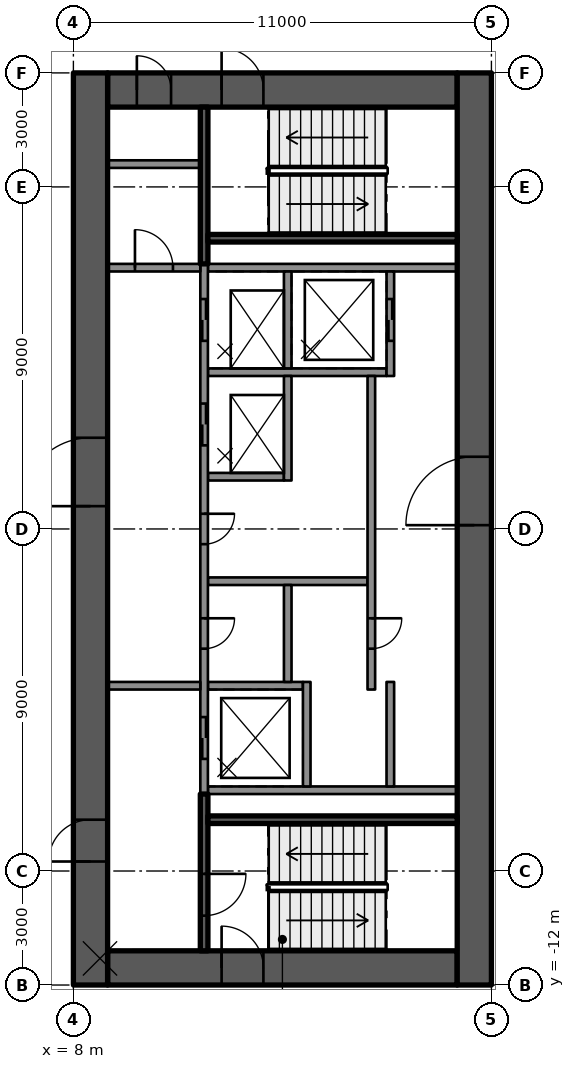
"""IFC4 building model, lengths in metres.
Left out: names, types, materials, properties, quantities, classifications, styles, units other than length and angle.
Written with IfcOpenShell. Run it as: python <this file> out.ifc"""

import sys

from ifc_helpers import new_model, si_unit, direction, frame, frame_2d, origin, place, context, subcontext, project, spatial, rectangle, extrude, element, fill, save


model = new_model("IFC4")
c1 = context("Model", 3, precision=1e-05, world=origin(), true_north=direction((0.0, 1.0)))
c2 = subcontext(c1, "Body", "Model", "MODEL_VIEW")
j1 = project(units=[si_unit("LENGTHUNIT", "METRE"), si_unit("PLANEANGLEUNIT", "RADIAN")], contexts=[c1])
p1 = place(None, origin())
s1 = spatial("IfcSite", under=j1, at=p1, CompositionType="ELEMENT")
p2 = place(p1, origin())
s2 = spatial("IfcBuilding", under=s1, at=p2, CompositionType="ELEMENT")
p3 = place(p2, frame((0.0, 0.0, 249.5)))
s3 = spatial("IfcBuildingStorey", under=s2, at=p3, CompositionType="ELEMENT", Elevation=249.5)
p4 = place(p3, frame((8.9, 11.55, 0.0), z_axis=(0.0, 0.0, 1.0), x_axis=(1.0, 0.0, 0.0)))
e1 = element("IfcWall", 1, at=p4, inside=s3, PredefinedType="SHEAR", context=c2, shape_type="SweptSolid", body=[
    extrude(rectangle(XDim=9.2, YDim=0.9, at=frame_2d((4.6, 0.0))), origin(), (0.0, 0.0, 1.0), 4.0),
])
p5 = place(p4, frame((3.0, 0.0, 0.0)))
e2 = element("IfcOpeningElement", 2, at=p5, cuts=e1, PredefinedType="OPENING", context=c2, shape_type="SweptSolid", body=[
    extrude(rectangle(XDim=1.1, YDim=2.1, at=frame_2d((0.55, 1.05))), frame((0.0, 0.46, 0.0), z_axis=(0.0, -1.0, 0.0), x_axis=(1.0, 0.0, 0.0)), (0.0, 0.0, 1.0), 0.92),
])
p6 = place(p4, frame((0.77, 0.0, 0.0)))
e3 = element("IfcOpeningElement", 3, at=p6, cuts=e1, PredefinedType="OPENING", context=c2, shape_type="SweptSolid", body=[
    extrude(rectangle(XDim=0.9, YDim=2.1, at=frame_2d((0.45, 1.05))), frame((0.0, 0.46, 0.0), z_axis=(0.0, -1.0, 0.0), x_axis=(1.0, 0.0, 0.0)), (0.0, 0.0, 1.0), 0.92),
])
p7 = place(p3, frame((8.9, -11.55, 0.0), z_axis=(0.0, 0.0, 1.0), x_axis=(1.0, 0.0, 0.0)))
e4 = element("IfcWall", 4, at=p7, inside=s3, PredefinedType="SHEAR", context=c2, shape_type="SweptSolid", body=[
    extrude(rectangle(XDim=9.2, YDim=0.9, at=frame_2d((4.6, 0.0))), origin(), (0.0, 0.0, 1.0), 4.0),
])
p8 = place(p7, frame((3.0, 0.0, 0.0)))
e5 = element("IfcOpeningElement", 5, at=p8, cuts=e4, PredefinedType="OPENING", context=c2, shape_type="SweptSolid", body=[
    extrude(rectangle(XDim=1.1, YDim=2.1, at=frame_2d((0.55, 1.05))), frame((0.0, 0.46, 0.0), z_axis=(0.0, -1.0, 0.0), x_axis=(1.0, 0.0, 0.0)), (0.0, 0.0, 1.0), 0.92),
])
p9 = place(p3, frame((8.45, -12.0, 0.0), z_axis=(0.0, 0.0, 1.0), x_axis=(0.0, 1.0, 0.0)))
e6 = element("IfcWall", 6, at=p9, inside=s3, PredefinedType="SHEAR", context=c2, shape_type="SweptSolid", body=[
    extrude(rectangle(XDim=24.0, YDim=0.9, at=frame_2d((12.0, 0.0))), origin(), (0.0, 0.0, 1.0), 4.0),
])
p10 = place(p9, frame((12.6, 0.0, 0.0)))
e7 = element("IfcOpeningElement", 7, at=p10, cuts=e6, PredefinedType="OPENING", context=c2, shape_type="SweptSolid", body=[
    extrude(rectangle(XDim=1.8, YDim=2.1, at=frame_2d((0.9, 1.05))), frame((0.0, 0.46, 0.0), z_axis=(0.0, -1.0, 0.0), x_axis=(1.0, 0.0, 0.0)), (0.0, 0.0, 1.0), 0.92),
])
p11 = place(p9, frame((3.25, 0.0, 0.0)))
e8 = element("IfcOpeningElement", 8, at=p11, cuts=e6, PredefinedType="OPENING", context=c2, shape_type="SweptSolid", body=[
    extrude(rectangle(XDim=1.1, YDim=2.1, at=frame_2d((0.55, 1.05))), frame((0.0, 0.46, 0.0), z_axis=(0.0, -1.0, 0.0), x_axis=(1.0, 0.0, 0.0)), (0.0, 0.0, 1.0), 0.92),
])
p12 = place(p3, frame((18.55, -12.0, 0.0), z_axis=(0.0, 0.0, 1.0), x_axis=(0.0, 1.0, 0.0)))
e9 = element("IfcWall", 9, at=p12, inside=s3, PredefinedType="SHEAR", context=c2, shape_type="SweptSolid", body=[
    extrude(rectangle(XDim=24.0, YDim=0.9, at=frame_2d((12.0, 0.0))), origin(), (0.0, 0.0, 1.0), 4.0),
])
p13 = place(p12, frame((12.1, 0.0, 0.0)))
e10 = element("IfcOpeningElement", 10, at=p13, cuts=e9, PredefinedType="OPENING", context=c2, shape_type="SweptSolid", body=[
    extrude(rectangle(XDim=1.8, YDim=2.1, at=frame_2d((0.9, 1.05))), frame((0.0, 0.46, 0.0), z_axis=(0.0, -1.0, 0.0), x_axis=(1.0, 0.0, 0.0)), (0.0, 0.0, 1.0), 0.92),
])
for number, where, z_axis, x_axis in (
    (11, (11.54, -6.875, 0.0), (0.0, 0.0, 1.0), (1.0, 0.0, 0.0)),
    (12, (11.54, 6.875, 0.0), (0.0, 0.0, 1.0), (1.0, 0.0, 0.0)),
):
    element("IfcWall", number, at=place(p3, frame(where, z_axis=z_axis, x_axis=x_axis)), inside=s3, PredefinedType="SOLIDWALL", context=c2, shape_type="SweptSolid", body=[
        extrude(rectangle(XDim=6.56, YDim=0.2, at=frame_2d((3.28, 0.0))), origin(), (0.0, 0.0, 1.0), 3.58),
    ])
p14 = place(p3, frame((11.54, 4.125, 0.0), z_axis=(0.0, 0.0, 1.0), x_axis=(1.0, 0.0, 0.0)))
e13 = element("IfcWall", 13, at=p14, inside=s3, PredefinedType="SOLIDWALL", context=c2, shape_type="SweptSolid", body=[
    extrude(rectangle(XDim=4.7, YDim=0.2, at=frame_2d((2.35, 0.0))), origin(), (0.0, 0.0, 1.0), 3.58),
])
p15 = place(p3, frame((11.54, 1.375, 0.0), z_axis=(0.0, 0.0, 1.0), x_axis=(1.0, 0.0, 0.0)))
e14 = element("IfcWall", 14, at=p15, inside=s3, PredefinedType="SOLIDWALL", context=c2, shape_type="SweptSolid", body=[
    extrude(rectangle(XDim=2.0, YDim=0.2, at=frame_2d((1.0, 0.0))), origin(), (0.0, 0.0, 1.0), 3.58),
])
p16 = place(p3, frame((11.54, -1.375, 0.0), z_axis=(0.0, 0.0, 1.0), x_axis=(1.0, 0.0, 0.0)))
e15 = element("IfcWall", 15, at=p16, inside=s3, PredefinedType="SOLIDWALL", context=c2, shape_type="SweptSolid", body=[
    extrude(rectangle(XDim=4.2, YDim=0.2, at=frame_2d((2.1, 0.0))), origin(), (0.0, 0.0, 1.0), 3.58),
])
p17 = place(p3, frame((11.54, -4.125, 0.0), z_axis=(0.0, 0.0, 1.0), x_axis=(1.0, 0.0, 0.0)))
e16 = element("IfcWall", 16, at=p17, inside=s3, PredefinedType="SOLIDWALL", context=c2, shape_type="SweptSolid", body=[
    extrude(rectangle(XDim=2.5, YDim=0.2, at=frame_2d((1.25, 0.0))), origin(), (0.0, 0.0, 1.0), 3.58),
])
p18 = place(p3, frame((11.44, 6.975, 0.0), z_axis=(0.0, 0.0, 1.0), x_axis=(0.0, -1.0, 0.0)))
e17 = element("IfcWall", 17, at=p18, inside=s3, PredefinedType="SOLIDWALL", context=c2, shape_type="SweptSolid", body=[
    extrude(rectangle(XDim=13.95, YDim=0.2, at=frame_2d((6.975, 0.0))), origin(), (0.0, 0.0, 1.0), 3.58),
])
p19 = place(p18, frame((0.925, 0.0, 0.0)))
e18 = element("IfcOpeningElement", 18, at=p19, cuts=e17, PredefinedType="OPENING", context=c2, shape_type="SweptSolid", body=[
    extrude(rectangle(XDim=1.1, YDim=2.1, at=frame_2d((0.55, 1.05))), frame((0.0, 0.11, 0.0), z_axis=(0.0, -1.0, 0.0), x_axis=(1.0, 0.0, 0.0)), (0.0, 0.0, 1.0), 0.22),
])
p20 = place(p18, frame((3.675, 0.0, 0.0)))
e19 = element("IfcOpeningElement", 19, at=p20, cuts=e17, PredefinedType="OPENING", context=c2, shape_type="SweptSolid", body=[
    extrude(rectangle(XDim=1.1, YDim=2.1, at=frame_2d((0.55, 1.05))), frame((0.0, 0.11, 0.0), z_axis=(0.0, -1.0, 0.0), x_axis=(1.0, 0.0, 0.0)), (0.0, 0.0, 1.0), 0.22),
])
p21 = place(p18, frame((11.925, 0.0, 0.0)))
e20 = element("IfcOpeningElement", 20, at=p21, cuts=e17, PredefinedType="OPENING", context=c2, shape_type="SweptSolid", body=[
    extrude(rectangle(XDim=1.1, YDim=2.1, at=frame_2d((0.55, 1.05))), frame((0.0, 0.11, 0.0), z_axis=(0.0, -1.0, 0.0), x_axis=(1.0, 0.0, 0.0)), (0.0, 0.0, 1.0), 0.22),
])
p22 = place(p18, frame((6.575, 0.0, 0.0)))
e21 = element("IfcOpeningElement", 21, at=p22, cuts=e17, PredefinedType="OPENING", context=c2, shape_type="SweptSolid", body=[
    extrude(rectangle(XDim=0.8, YDim=2.1, at=frame_2d((0.4, 1.05))), frame((0.0, 0.11, 0.0), z_axis=(0.0, -1.0, 0.0), x_axis=(1.0, 0.0, 0.0)), (0.0, 0.0, 1.0), 0.22),
])
p23 = place(p18, frame((9.325, 0.0, 0.0)))
e22 = element("IfcOpeningElement", 22, at=p23, cuts=e17, PredefinedType="OPENING", context=c2, shape_type="SweptSolid", body=[
    extrude(rectangle(XDim=0.8, YDim=2.1, at=frame_2d((0.4, 1.05))), frame((0.0, 0.11, 0.0), z_axis=(0.0, -1.0, 0.0), x_axis=(1.0, 0.0, 0.0)), (0.0, 0.0, 1.0), 0.22),
])
p24 = place(p3, frame((13.64, 6.775, 0.0), z_axis=(0.0, 0.0, 1.0), x_axis=(0.0, -1.0, 0.0)))
e23 = element("IfcWall", 23, at=p24, inside=s3, PredefinedType="SOLIDWALL", context=c2, shape_type="SweptSolid", body=[
    extrude(rectangle(XDim=2.55, YDim=0.2, at=frame_2d((1.275, 0.0))), origin(), (0.0, 0.0, 1.0), 3.58),
])
p25 = place(p3, frame((13.64, 4.025, 0.0), z_axis=(0.0, 0.0, 1.0), x_axis=(0.0, -1.0, 0.0)))
e24 = element("IfcWall", 24, at=p25, inside=s3, PredefinedType="SOLIDWALL", context=c2, shape_type="SweptSolid", body=[
    extrude(rectangle(XDim=2.75, YDim=0.2, at=frame_2d((1.375, 0.0))), origin(), (0.0, 0.0, 1.0), 3.58),
])
p26 = place(p3, frame((13.64, -1.475, 0.0), z_axis=(0.0, 0.0, 1.0), x_axis=(0.0, -1.0, 0.0)))
e25 = element("IfcWall", 25, at=p26, inside=s3, PredefinedType="SOLIDWALL", context=c2, shape_type="SweptSolid", body=[
    extrude(rectangle(XDim=2.55, YDim=0.2, at=frame_2d((1.275, 0.0))), origin(), (0.0, 0.0, 1.0), 3.58),
])
p27 = place(p3, frame((14.14, -4.025, 0.0), z_axis=(0.0, 0.0, 1.0), x_axis=(0.0, -1.0, 0.0)))
e26 = element("IfcWall", 26, at=p27, inside=s3, PredefinedType="SOLIDWALL", context=c2, shape_type="SweptSolid", body=[
    extrude(rectangle(XDim=2.75, YDim=0.2, at=frame_2d((1.375, 0.0))), origin(), (0.0, 0.0, 1.0), 3.58),
])
p28 = place(p3, frame((16.34, 6.775, 0.0), z_axis=(0.0, 0.0, 1.0), x_axis=(0.0, -1.0, 0.0)))
e27 = element("IfcWall", 27, at=p28, inside=s3, PredefinedType="SOLIDWALL", context=c2, shape_type="SweptSolid", body=[
    extrude(rectangle(XDim=2.75, YDim=0.2, at=frame_2d((1.375, 0.0))), origin(), (0.0, 0.0, 1.0), 3.58),
])
p29 = place(p28, frame((0.725, 0.0, 0.0)))
e28 = element("IfcOpeningElement", 28, at=p29, cuts=e27, PredefinedType="OPENING", context=c2, shape_type="SweptSolid", body=[
    extrude(rectangle(XDim=1.1, YDim=2.1, at=frame_2d((0.55, 1.05))), frame((0.0, 0.11, 0.0), z_axis=(0.0, -1.0, 0.0), x_axis=(1.0, 0.0, 0.0)), (0.0, 0.0, 1.0), 0.22),
])
p30 = place(p3, frame((15.84, 4.025, 0.0), z_axis=(0.0, 0.0, 1.0), x_axis=(0.0, -1.0, 0.0)))
e29 = element("IfcWall", 29, at=p30, inside=s3, PredefinedType="SOLIDWALL", context=c2, shape_type="SweptSolid", body=[
    extrude(rectangle(XDim=8.25, YDim=0.2, at=frame_2d((4.125, 0.0))), origin(), (0.0, 0.0, 1.0), 3.58),
])
p31 = place(p30, frame((6.375, 0.0, 0.0)))
e30 = element("IfcOpeningElement", 30, at=p31, cuts=e29, PredefinedType="OPENING", context=c2, shape_type="SweptSolid", body=[
    extrude(rectangle(XDim=0.8, YDim=2.1, at=frame_2d((0.4, 1.05))), frame((0.0, 0.11, 0.0), z_axis=(0.0, -1.0, 0.0), x_axis=(1.0, 0.0, 0.0)), (0.0, 0.0, 1.0), 0.22),
])
p32 = place(p3, frame((16.34, -4.025, 0.0), z_axis=(0.0, 0.0, 1.0), x_axis=(0.0, -1.0, 0.0)))
e31 = element("IfcWall", 31, at=p32, inside=s3, PredefinedType="SOLIDWALL", context=c2, shape_type="SweptSolid", body=[
    extrude(rectangle(XDim=2.75, YDim=0.2, at=frame_2d((1.375, 0.0))), origin(), (0.0, 0.0, 1.0), 3.58),
])
p33 = place(p3, frame((11.44, -6.975, 0.0), z_axis=(0.0, 0.0, 1.0), x_axis=(0.0, -1.0, 0.0)))
e32 = element("IfcWall", 32, at=p33, inside=s3, PredefinedType="SOLIDWALL", context=c2, shape_type="SweptSolid", body=[
    extrude(rectangle(XDim=4.125, YDim=0.2, at=frame_2d((2.062, 0.0))), origin(), (0.0, 0.0, 1.0), 3.58),
])
p34 = place(p33, frame((2.1, 0.0, 0.0)))
e33 = element("IfcOpeningElement", 33, at=p34, cuts=e32, PredefinedType="OPENING", context=c2, shape_type="SweptSolid", body=[
    extrude(rectangle(XDim=1.1, YDim=2.1, at=frame_2d((0.55, 1.05))), frame((0.0, 0.11, 0.0), z_axis=(0.0, -1.0, 0.0), x_axis=(1.0, 0.0, 0.0)), (0.0, 0.0, 1.0), 0.22),
])
p35 = place(p3, frame((11.54, -7.65, 0.0), z_axis=(0.0, 0.0, 1.0), x_axis=(1.0, 0.0, 0.0)))
e34 = element("IfcWall", 34, at=p35, inside=s3, PredefinedType="SOLIDWALL", context=c2, shape_type="SweptSolid", body=[
    extrude(rectangle(XDim=6.56, YDim=0.2, at=frame_2d((3.28, 0.0))), origin(), (0.0, 0.0, 1.0), 3.58),
])
p36 = place(p3, frame((11.44, 11.1, 0.0), z_axis=(0.0, 0.0, 1.0), x_axis=(0.0, -1.0, 0.0)))
e35 = element("IfcWall", 35, at=p36, inside=s3, PredefinedType="SOLIDWALL", context=c2, shape_type="SweptSolid", body=[
    extrude(rectangle(XDim=4.125, YDim=0.2, at=frame_2d((2.062, 0.0))), origin(), (0.0, 0.0, 1.0), 3.58),
])
p37 = place(p3, frame((11.54, 7.65, 0.0), z_axis=(0.0, 0.0, 1.0), x_axis=(1.0, 0.0, 0.0)))
e36 = element("IfcWall", 36, at=p37, inside=s3, PredefinedType="SOLIDWALL", context=c2, shape_type="SweptSolid", body=[
    extrude(rectangle(XDim=6.56, YDim=0.2, at=frame_2d((3.28, 0.0))), origin(), (0.0, 0.0, 1.0), 3.58),
])
p38 = place(p3, frame((8.9, -4.125, 0.0), z_axis=(0.0, 0.0, 1.0), x_axis=(1.0, 0.0, 0.0)))
e37 = element("IfcWall", 37, at=p38, inside=s3, PredefinedType="PARTITIONING", context=c2, shape_type="SweptSolid", body=[
    extrude(rectangle(XDim=2.44, YDim=0.2, at=frame_2d((1.22, 0.0))), origin(), (0.0, 0.0, 1.0), 3.58),
])
p39 = place(p3, frame((8.9, 6.875, 0.0), z_axis=(0.0, 0.0, 1.0), x_axis=(1.0, 0.0, 0.0)))
e38 = element("IfcWall", 38, at=p39, inside=s3, PredefinedType="PARTITIONING", context=c2, shape_type="SweptSolid", body=[
    extrude(rectangle(XDim=2.44, YDim=0.2, at=frame_2d((1.22, 0.0))), origin(), (0.0, 0.0, 1.0), 3.58),
])
p40 = place(p39, frame((0.72, 0.0, 0.0)))
e39 = element("IfcOpeningElement", 39, at=p40, cuts=e38, PredefinedType="OPENING", context=c2, shape_type="SweptSolid", body=[
    extrude(rectangle(XDim=1.0, YDim=2.1, at=frame_2d((0.5, 1.05))), frame((0.0, 0.11, 0.0), z_axis=(0.0, -1.0, 0.0), x_axis=(1.0, 0.0, 0.0)), (0.0, 0.0, 1.0), 0.22),
])
p41 = place(p3, frame((8.9, 9.6, 0.0), z_axis=(0.0, 0.0, 1.0), x_axis=(1.0, 0.0, 0.0)))
e40 = element("IfcWall", 40, at=p41, inside=s3, PredefinedType="PARTITIONING", context=c2, shape_type="SweptSolid", body=[
    extrude(rectangle(XDim=2.44, YDim=0.2, at=frame_2d((1.22, 0.0))), origin(), (0.0, 0.0, 1.0), 3.58),
])
p42 = place(p19, origin())
e41 = element("IfcDoor", 41, at=p42, inside=s3, OperationType="DOUBLE_DOOR_SLIDING", PredefinedType="DOOR", context=c2, shape_type="SweptSolid", body=[
    extrude(rectangle(XDim=1.1, YDim=2.1, at=frame_2d((0.55, 1.05))), frame((0.0, 0.025, 0.0), z_axis=(0.0, -1.0, 0.0), x_axis=(1.0, 0.0, 0.0)), (0.0, 0.0, 1.0), 0.05),
])
fill(e18, e41)
p43 = place(p29, origin())
e42 = element("IfcDoor", 42, at=p43, inside=s3, OperationType="DOUBLE_DOOR_SLIDING", PredefinedType="DOOR", context=c2, shape_type="SweptSolid", body=[
    extrude(rectangle(XDim=1.1, YDim=2.1, at=frame_2d((0.55, 1.05))), frame((0.0, 0.025, 0.0), z_axis=(0.0, -1.0, 0.0), x_axis=(1.0, 0.0, 0.0)), (0.0, 0.0, 1.0), 0.05),
])
fill(e28, e42)
p44 = place(p20, origin())
e43 = element("IfcDoor", 43, at=p44, inside=s3, OperationType="DOUBLE_DOOR_SLIDING", PredefinedType="DOOR", context=c2, shape_type="SweptSolid", body=[
    extrude(rectangle(XDim=1.1, YDim=2.1, at=frame_2d((0.55, 1.05))), frame((0.0, 0.025, 0.0), z_axis=(0.0, -1.0, 0.0), x_axis=(1.0, 0.0, 0.0)), (0.0, 0.0, 1.0), 0.05),
])
fill(e19, e43)
p45 = place(p21, origin())
e44 = element("IfcDoor", 44, at=p45, inside=s3, OperationType="DOUBLE_DOOR_SLIDING", PredefinedType="DOOR", context=c2, shape_type="SweptSolid", body=[
    extrude(rectangle(XDim=1.1, YDim=2.1, at=frame_2d((0.55, 1.05))), frame((0.0, 0.025, 0.0), z_axis=(0.0, -1.0, 0.0), x_axis=(1.0, 0.0, 0.0)), (0.0, 0.0, 1.0), 0.05),
])
fill(e20, e44)
p46 = place(p22, origin())
e45 = element("IfcDoor", 45, at=p46, inside=s3, OperationType="SINGLE_SWING_RIGHT", PredefinedType="DOOR", context=c2, shape_type="SweptSolid", body=[
    extrude(rectangle(XDim=0.8, YDim=2.1, at=frame_2d((0.4, 1.05))), frame((0.0, 0.025, 0.0), z_axis=(0.0, -1.0, 0.0), x_axis=(1.0, 0.0, 0.0)), (0.0, 0.0, 1.0), 0.05),
])
fill(e21, e45)
p47 = place(p23, origin())
e46 = element("IfcDoor", 46, at=p47, inside=s3, OperationType="SINGLE_SWING_LEFT", PredefinedType="DOOR", context=c2, shape_type="SweptSolid", body=[
    extrude(rectangle(XDim=0.8, YDim=2.1, at=frame_2d((0.4, 1.05))), frame((0.0, 0.025, 0.0), z_axis=(0.0, -1.0, 0.0), x_axis=(1.0, 0.0, 0.0)), (0.0, 0.0, 1.0), 0.05),
])
fill(e22, e46)
p48 = place(p31, origin())
e47 = element("IfcDoor", 47, at=p48, inside=s3, OperationType="SINGLE_SWING_LEFT", PredefinedType="DOOR", context=c2, shape_type="SweptSolid", body=[
    extrude(rectangle(XDim=0.8, YDim=2.1, at=frame_2d((0.4, 1.05))), frame((0.0, 0.025, 0.0), z_axis=(0.0, -1.0, 0.0), x_axis=(1.0, 0.0, 0.0)), (0.0, 0.0, 1.0), 0.05),
])
fill(e30, e47)
p49 = place(p10, origin())
e48 = element("IfcDoor", 48, at=p49, inside=s3, OperationType="SINGLE_SWING_RIGHT", PredefinedType="DOOR", context=c2, shape_type="SweptSolid", body=[
    extrude(rectangle(XDim=1.8, YDim=2.1, at=frame_2d((0.9, 1.05))), frame((0.0, 0.025, 0.0), z_axis=(0.0, -1.0, 0.0), x_axis=(1.0, 0.0, 0.0)), (0.0, 0.0, 1.0), 0.05),
])
fill(e7, e48)
p50 = place(p13, origin())
e49 = element("IfcDoor", 49, at=p50, inside=s3, OperationType="SINGLE_SWING_RIGHT", PredefinedType="DOOR", context=c2, shape_type="SweptSolid", body=[
    extrude(rectangle(XDim=1.8, YDim=2.1, at=frame_2d((0.9, 1.05))), frame((0.0, 0.025, 0.0), z_axis=(0.0, -1.0, 0.0), x_axis=(1.0, 0.0, 0.0)), (0.0, 0.0, 1.0), 0.05),
])
fill(e10, e49)
p51 = place(p11, origin())
e50 = element("IfcDoor", 50, at=p51, inside=s3, OperationType="SINGLE_SWING_LEFT", PredefinedType="DOOR", context=c2, shape_type="SweptSolid", body=[
    extrude(rectangle(XDim=1.1, YDim=2.1, at=frame_2d((0.55, 1.05))), frame((0.0, 0.025, 0.0), z_axis=(0.0, -1.0, 0.0), x_axis=(1.0, 0.0, 0.0)), (0.0, 0.0, 1.0), 0.05),
])
fill(e8, e50)
p52 = place(p8, origin())
e51 = element("IfcDoor", 51, at=p52, inside=s3, OperationType="SINGLE_SWING_LEFT", PredefinedType="DOOR", context=c2, shape_type="SweptSolid", body=[
    extrude(rectangle(XDim=1.1, YDim=2.1, at=frame_2d((0.55, 1.05))), frame((0.0, 0.025, 0.0), z_axis=(0.0, -1.0, 0.0), x_axis=(1.0, 0.0, 0.0)), (0.0, 0.0, 1.0), 0.05),
])
fill(e5, e51)
p53 = place(p5, origin())
e52 = element("IfcDoor", 52, at=p53, inside=s3, OperationType="SINGLE_SWING_LEFT", PredefinedType="DOOR", context=c2, shape_type="SweptSolid", body=[
    extrude(rectangle(XDim=1.1, YDim=2.1, at=frame_2d((0.55, 1.05))), frame((0.0, 0.025, 0.0), z_axis=(0.0, -1.0, 0.0), x_axis=(1.0, 0.0, 0.0)), (0.0, 0.0, 1.0), 0.05),
])
fill(e2, e52)
p54 = place(p34, origin())
e53 = element("IfcDoor", 53, at=p54, inside=s3, OperationType="SINGLE_SWING_RIGHT", PredefinedType="DOOR", context=c2, shape_type="SweptSolid", body=[
    extrude(rectangle(XDim=1.1, YDim=2.1, at=frame_2d((0.55, 1.05))), frame((0.0, 0.025, 0.0), z_axis=(0.0, -1.0, 0.0), x_axis=(1.0, 0.0, 0.0)), (0.0, 0.0, 1.0), 0.05),
])
fill(e33, e53)
p55 = place(p6, origin())
e54 = element("IfcDoor", 54, at=p55, inside=s3, OperationType="SINGLE_SWING_LEFT", PredefinedType="DOOR", context=c2, shape_type="SweptSolid", body=[
    extrude(rectangle(XDim=0.9, YDim=2.1, at=frame_2d((0.45, 1.05))), frame((0.0, 0.025, 0.0), z_axis=(0.0, -1.0, 0.0), x_axis=(1.0, 0.0, 0.0)), (0.0, 0.0, 1.0), 0.05),
])
fill(e3, e54)
p56 = place(p40, origin())
e55 = element("IfcDoor", 55, at=p56, inside=s3, OperationType="SINGLE_SWING_RIGHT", PredefinedType="DOOR", context=c2, shape_type="SweptSolid", body=[
    extrude(rectangle(XDim=1.0, YDim=2.1, at=frame_2d((0.5, 1.05))), frame((0.0, 0.025, 0.0), z_axis=(0.0, -1.0, 0.0), x_axis=(1.0, 0.0, 0.0)), (0.0, 0.0, 1.0), 0.05),
])
fill(e39, e55)
save(model, sys.argv[1])
